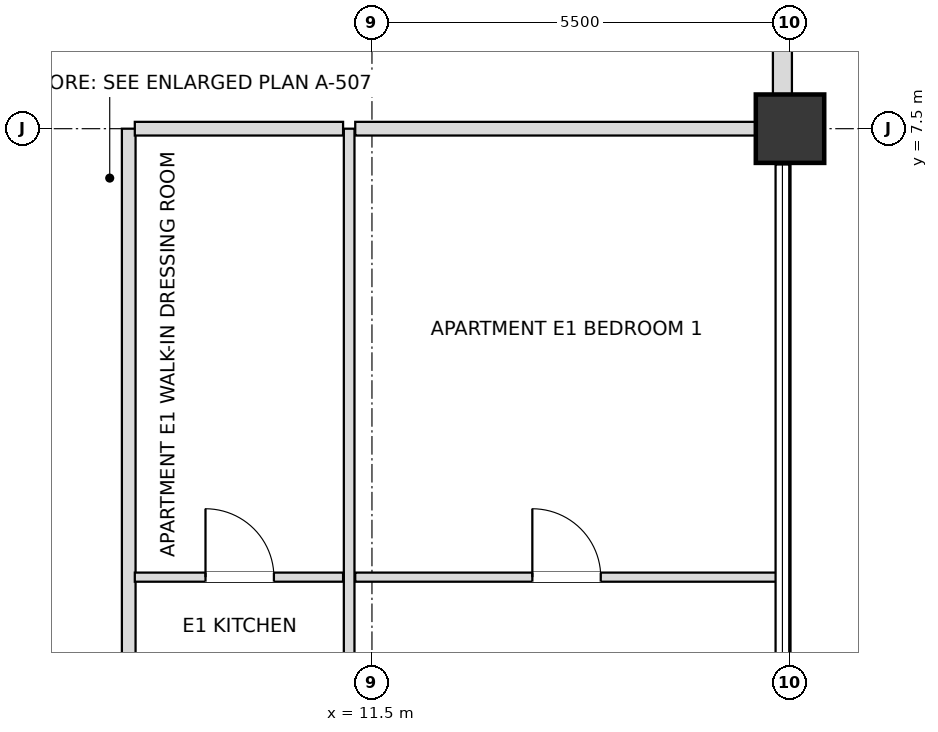
"""IFC4 building model, lengths in metres.
Left out: names, types, materials, properties, quantities, classifications, styles, units other than length and angle.
Written with IfcOpenShell. Run it as: python <this file> out.ifc"""

import sys

from ifc_helpers import new_model, si_unit, direction, frame, frame_2d, origin, origin_2d, place, context, subcontext, project, spatial, rectangle, extrude, element, fill, save


model = new_model("IFC4")
c1 = context("Model", 3, precision=1e-05, world=origin(), true_north=direction((0.0, 1.0)))
c2 = subcontext(c1, "Body", "Model", "MODEL_VIEW")
j1 = project(units=[si_unit("LENGTHUNIT", "METRE"), si_unit("PLANEANGLEUNIT", "RADIAN")], contexts=[c1])
p1 = place(None, origin())
s1 = spatial("IfcSite", under=j1, at=p1, CompositionType="ELEMENT")
p2 = place(p1, origin())
s2 = spatial("IfcBuilding", under=s1, at=p2, CompositionType="ELEMENT")
p3 = place(p2, frame((0.0, 0.0, 279.9)))
s3 = spatial("IfcBuildingStorey", under=s2, at=p3, CompositionType="ELEMENT", Elevation=279.9)
p4 = place(p3, frame((17.0, 7.5, 0.0), z_axis=(0.0, 0.0, 1.0), x_axis=(1.0, 0.0, 0.0)))
e1 = element("IfcColumn", 1, at=p4, inside=s3, PredefinedType="USERDEFINED", context=c2, shape_type="SweptSolid", body=[
    extrude(rectangle(XDim=0.9, YDim=0.9, at=origin_2d()), origin(), (0.0, 0.0, 1.0), 3.6),
])
p5 = place(p3, frame((16.9, 7.945, 0.0), z_axis=(0.0, 0.0, 1.0), x_axis=(0.0, 1.0, 0.0)))
e2 = element("IfcWall", 2, at=p5, inside=s3, PredefinedType="SOLIDWALL", context=c2, shape_type="SweptSolid", body=[
    extrude(rectangle(XDim=4.61, YDim=0.25, at=frame_2d((2.305, 0.0))), origin(), (0.0, 0.0, 1.0), 2.748),
])
p6 = place(p5, frame((1.405, 0.0, 0.72)))
e3 = element("IfcOpeningElement", 3, at=p6, cuts=e2, PredefinedType="OPENING", context=c2, shape_type="SweptSolid", body=[
    extrude(rectangle(XDim=1.8, YDim=1.68, at=frame_2d((0.9, 0.84))), frame((0.0, 0.135, 0.0), z_axis=(0.0, -1.0, 0.0), x_axis=(1.0, 0.0, 0.0)), (0.0, 0.0, 1.0), 0.27),
])
p7 = place(p3, frame((8.3, -7.5, 0.0), z_axis=(0.0, 0.0, 1.0), x_axis=(0.0, 1.0, 0.0)))
e4 = element("IfcWall", 4, at=p7, inside=s3, PredefinedType="PARTITIONING", context=c2, shape_type="SweptSolid", body=[
    extrude(rectangle(XDim=15.0, YDim=0.18, at=frame_2d((7.5, 0.0))), origin(), (0.0, 0.0, 1.0), 3.38),
])
p8 = place(p7, frame((2.355, 0.0, 0.0)))
e5 = element("IfcOpeningElement", 5, at=p8, cuts=e4, PredefinedType="OPENING", context=c2, shape_type="SweptSolid", body=[
    extrude(rectangle(XDim=0.95, YDim=2.15, at=frame_2d((0.475, 1.075))), frame((0.0, 0.1, 0.0), z_axis=(0.0, -1.0, 0.0), x_axis=(1.0, 0.0, 0.0)), (0.0, 0.0, 1.0), 0.2),
])
p9 = place(p3, frame((11.2, -7.5, 0.0), z_axis=(0.0, 0.0, 1.0), x_axis=(0.0, 1.0, 0.0)))
e6 = element("IfcWall", 6, at=p9, inside=s3, PredefinedType="PARTITIONING", context=c2, shape_type="SweptSolid", body=[
    extrude(rectangle(XDim=15.0, YDim=0.14, at=frame_2d((7.5, 0.0))), origin(), (0.0, 0.0, 1.0), 3.38),
])
p10 = place(p9, frame((3.475, 0.0, 0.0)))
e7 = element("IfcOpeningElement", 7, at=p10, cuts=e6, PredefinedType="OPENING", context=c2, shape_type="SweptSolid", body=[
    extrude(rectangle(XDim=0.95, YDim=2.1, at=frame_2d((0.475, 1.05))), frame((0.0, 0.08, 0.0), z_axis=(0.0, -1.0, 0.0), x_axis=(1.0, 0.0, 0.0)), (0.0, 0.0, 1.0), 0.16),
])
p11 = place(p3, frame((8.38, 1.6, 0.0), z_axis=(0.0, 0.0, 1.0), x_axis=(1.0, 0.0, 0.0)))
e8 = element("IfcWall", 8, at=p11, inside=s3, PredefinedType="PARTITIONING", context=c2, shape_type="SweptSolid", body=[
    extrude(rectangle(XDim=2.74, YDim=0.12, at=frame_2d((1.37, 0.0))), origin(), (0.0, 0.0, 1.0), 3.38),
])
p12 = place(p11, frame((0.93, 0.0, 0.0)))
e9 = element("IfcOpeningElement", 9, at=p12, cuts=e8, PredefinedType="OPENING", context=c2, shape_type="SweptSolid", body=[
    extrude(rectangle(XDim=0.9, YDim=2.1, at=frame_2d((0.45, 1.05))), frame((0.0, 0.07, 0.0), z_axis=(0.0, -1.0, 0.0), x_axis=(1.0, 0.0, 0.0)), (0.0, 0.0, 1.0), 0.14),
])
p13 = place(p3, frame((11.28, 1.6, 0.0), z_axis=(0.0, 0.0, 1.0), x_axis=(1.0, 0.0, 0.0)))
e10 = element("IfcWall", 10, at=p13, inside=s3, PredefinedType="PARTITIONING", context=c2, shape_type="SweptSolid", body=[
    extrude(rectangle(XDim=5.54, YDim=0.12, at=frame_2d((2.77, 0.0))), origin(), (0.0, 0.0, 1.0), 3.018),
])
p14 = place(p13, frame((2.33, 0.0, 0.0)))
e11 = element("IfcOpeningElement", 11, at=p14, cuts=e10, PredefinedType="OPENING", context=c2, shape_type="SweptSolid", body=[
    extrude(rectangle(XDim=0.9, YDim=2.1, at=frame_2d((0.45, 1.05))), frame((0.0, 0.07, 0.0), z_axis=(0.0, -1.0, 0.0), x_axis=(1.0, 0.0, 0.0)), (0.0, 0.0, 1.0), 0.14),
])
p15 = place(p3, frame((8.38, 7.5, 0.0), z_axis=(0.0, 0.0, 1.0), x_axis=(1.0, 0.0, 0.0)))
e12 = element("IfcWall", 12, at=p15, inside=s3, PredefinedType="PARTITIONING", context=c2, shape_type="SweptSolid", body=[
    extrude(rectangle(XDim=2.74, YDim=0.18, at=frame_2d((1.37, 0.0))), origin(), (0.0, 0.0, 1.0), 2.826),
])
p16 = place(p3, frame((11.28, 7.5, 0.0), z_axis=(0.0, 0.0, 1.0), x_axis=(1.0, 0.0, 0.0)))
e13 = element("IfcWall", 13, at=p16, inside=s3, PredefinedType="PARTITIONING", context=c2, shape_type="SweptSolid", body=[
    extrude(rectangle(XDim=5.62, YDim=0.18, at=frame_2d((2.81, 0.0))), origin(), (0.0, 0.0, 1.0), 2.826),
])
p17 = place(p12, origin())
e14 = element("IfcDoor", 14, at=p17, inside=s3, OperationType="SINGLE_SWING_LEFT", PredefinedType="DOOR", context=c2, shape_type="SweptSolid", body=[
    extrude(rectangle(XDim=0.9, YDim=2.1, at=frame_2d((0.45, 1.05))), frame((0.0, 0.025, 0.0), z_axis=(0.0, -1.0, 0.0), x_axis=(1.0, 0.0, 0.0)), (0.0, 0.0, 1.0), 0.05),
])
fill(e9, e14)
p18 = place(p14, origin())
e15 = element("IfcDoor", 15, at=p18, inside=s3, OperationType="SINGLE_SWING_LEFT", PredefinedType="DOOR", context=c2, shape_type="SweptSolid", body=[
    extrude(rectangle(XDim=0.9, YDim=2.1, at=frame_2d((0.45, 1.05))), frame((0.0, 0.025, 0.0), z_axis=(0.0, -1.0, 0.0), x_axis=(1.0, 0.0, 0.0)), (0.0, 0.0, 1.0), 0.05),
])
fill(e11, e15)
save(model, sys.argv[1])
